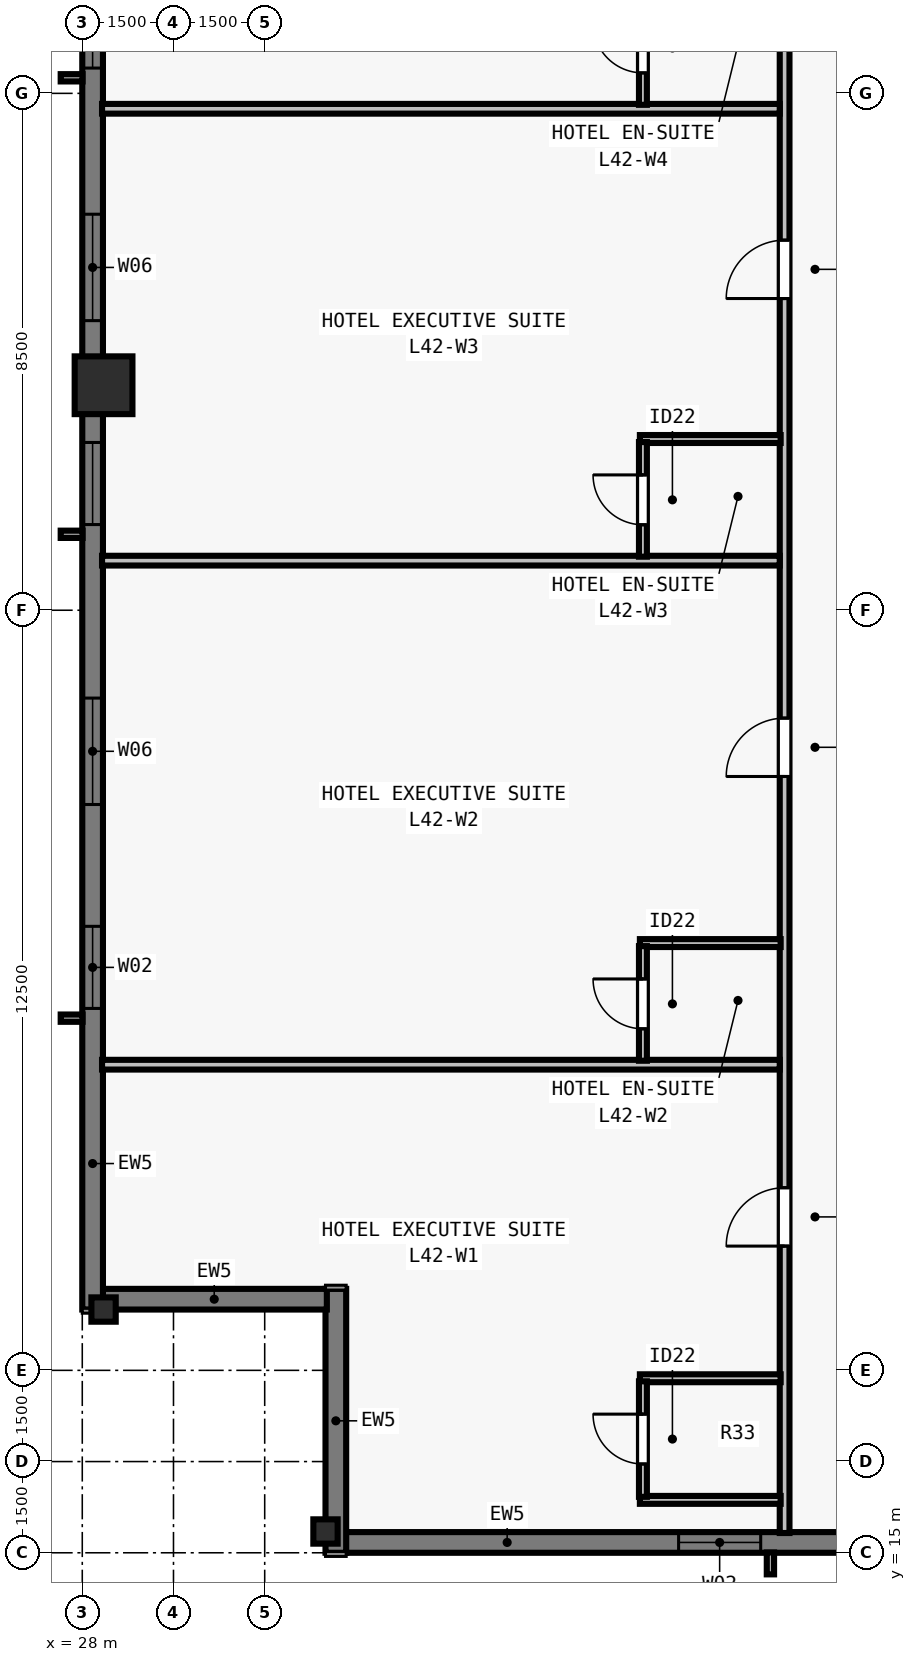
"""IFC4 building model, lengths in metres.
Left out: names, types, materials, properties, quantities, classifications, styles, units other than length and angle.
Written with IfcOpenShell. Run it as: python <this file> out.ifc"""

import sys

from ifc_helpers import new_model, si_unit, direction, frame, frame_2d, origin, origin_2d, place, context, subcontext, project, spatial, rectangle, i_section, extrude, element, fill, save


model = new_model("IFC4")
c1 = context("Model", 3, precision=1e-05, world=origin(), true_north=direction((0.0, 1.0)))
c2 = subcontext(c1, "Body", "Model", "MODEL_VIEW")
j1 = project(units=[si_unit("LENGTHUNIT", "METRE"), si_unit("PLANEANGLEUNIT", "RADIAN")], contexts=[c1])
p1 = place(None, origin())
s1 = spatial("IfcSite", under=j1, at=p1, CompositionType="ELEMENT")
p2 = place(p1, origin())
s2 = spatial("IfcBuilding", under=s1, at=p2, CompositionType="ELEMENT")
p3 = place(p2, frame((0.0, 0.0, 155.0)))
s3 = spatial("IfcBuildingStorey", under=s2, at=p3, CompositionType="ELEMENT", Elevation=155.0)
p4 = place(p3, frame((32.0, 15.35, 0.0), z_axis=(0.0, 0.0, 1.0), x_axis=(1.0, 0.0, 0.0)))
e1 = element("IfcColumn", 1, at=p4, inside=s3, PredefinedType="COLUMN", context=c2, shape_type="SweptSolid", body=[
    extrude(i_section(OverallWidth=0.4, OverallDepth=0.4, WebThickness=0.022, FlangeThickness=0.036, at=origin_2d()), origin(), (0.0, 0.0, 1.0), 3.5),
])
p5 = place(p3, frame((28.35, 34.2, 0.0), z_axis=(0.0, 0.0, 1.0), x_axis=(0.0, 1.0, 0.0)))
e2 = element("IfcColumn", 2, at=p5, inside=s3, PredefinedType="COLUMN", context=c2, shape_type="SweptSolid", body=[
    extrude(rectangle(XDim=0.95, YDim=0.95, at=origin_2d()), origin(), (0.0, 0.0, 1.0), 3.5),
])
p6 = place(p3, frame((28.35, 19.0, 0.0), z_axis=(0.0, 0.0, 1.0), x_axis=(0.0, 1.0, 0.0)))
e3 = element("IfcColumn", 3, at=p6, inside=s3, PredefinedType="COLUMN", context=c2, shape_type="SweptSolid", body=[
    extrude(i_section(OverallWidth=0.4, OverallDepth=0.4, WebThickness=0.022, FlangeThickness=0.036, at=origin_2d()), origin(), (0.0, 0.0, 1.0), 3.5),
])
p7 = place(p3, frame((48.6, 15.17, 0.0), z_axis=(0.0, 0.0, 1.0), x_axis=(-1.0, 0.0, 0.0)))
e4 = element("IfcWall", 4, at=p7, inside=s3, PredefinedType="SOLIDWALL", context=c2, shape_type="SweptSolid", body=[
    extrude(rectangle(XDim=16.282, YDim=0.34, at=frame_2d((8.141, 0.0))), origin(), (0.0, 0.0, 1.0), 3.28),
])
p8 = place(p7, frame((2.439, 0.0, 0.8)))
e5 = element("IfcOpeningElement", 5, at=p8, cuts=e4, PredefinedType="OPENING", context=c2, shape_type="SweptSolid", body=[
    extrude(rectangle(XDim=1.35, YDim=1.66, at=frame_2d((0.675, 0.83))), frame((0.0, 0.18, 0.0), z_axis=(0.0, -1.0, 0.0), x_axis=(1.0, 0.0, 0.0)), (0.0, 0.0, 1.0), 0.36),
])
p9 = place(p7, frame((4.716, 0.0, 0.8)))
e6 = element("IfcOpeningElement", 6, at=p9, cuts=e4, PredefinedType="OPENING", context=c2, shape_type="SweptSolid", body=[
    extrude(rectangle(XDim=1.75, YDim=1.66, at=frame_2d((0.875, 0.83))), frame((0.0, 0.18, 0.0), z_axis=(0.0, -1.0, 0.0), x_axis=(1.0, 0.0, 0.0)), (0.0, 0.0, 1.0), 0.36),
])
p10 = place(p7, frame((9.443, 0.0, 0.8)))
e7 = element("IfcOpeningElement", 7, at=p10, cuts=e4, PredefinedType="OPENING", context=c2, shape_type="SweptSolid", body=[
    extrude(rectangle(XDim=1.35, YDim=1.66, at=frame_2d((0.675, 0.83))), frame((0.0, 0.18, 0.0), z_axis=(0.0, -1.0, 0.0), x_axis=(1.0, 0.0, 0.0)), (0.0, 0.0, 1.0), 0.36),
])
p11 = place(p3, frame((32.17, 15.0, 0.0), z_axis=(0.0, 0.0, 1.0), x_axis=(0.0, 1.0, 0.0)))
e8 = element("IfcWall", 8, at=p11, inside=s3, PredefinedType="SOLIDWALL", context=c2, shape_type="SweptSolid", body=[
    extrude(rectangle(XDim=4.34, YDim=0.34, at=frame_2d((2.17, 0.0))), origin(), (0.0, 0.0, 1.0), 3.28),
])
p12 = place(p3, frame((32.022, 19.17, 0.0), z_axis=(0.0, 0.0, 1.0), x_axis=(-1.0, 0.0, 0.0)))
e9 = element("IfcWall", 9, at=p12, inside=s3, PredefinedType="SOLIDWALL", context=c2, shape_type="SweptSolid", body=[
    extrude(rectangle(XDim=3.704, YDim=0.34, at=frame_2d((1.852, 0.0))), origin(), (0.0, 0.0, 1.0), 3.28),
])
p13 = place(p3, frame((28.17, 19.0, 0.0), z_axis=(0.0, 0.0, 1.0), x_axis=(0.0, 1.0, 0.0)))
e10 = element("IfcWall", 10, at=p13, inside=s3, PredefinedType="SOLIDWALL", context=c2, shape_type="SweptSolid", body=[
    extrude(rectangle(XDim=39.682, YDim=0.34, at=frame_2d((19.841, 0.0))), origin(), (0.0, 0.0, 1.0), 3.28),
])
p14 = place(p13, frame((4.952, 0.0, 0.8)))
e11 = element("IfcOpeningElement", 11, at=p14, cuts=e10, PredefinedType="OPENING", context=c2, shape_type="SweptSolid", body=[
    extrude(rectangle(XDim=1.35, YDim=1.66, at=frame_2d((0.675, 0.83))), frame((0.0, 0.18, 0.0), z_axis=(0.0, -1.0, 0.0), x_axis=(1.0, 0.0, 0.0)), (0.0, 0.0, 1.0), 0.36),
])
p15 = place(p13, frame((8.305, 0.0, 0.8)))
e12 = element("IfcOpeningElement", 12, at=p15, cuts=e10, PredefinedType="OPENING", context=c2, shape_type="SweptSolid", body=[
    extrude(rectangle(XDim=1.75, YDim=1.66, at=frame_2d((0.875, 0.83))), frame((0.0, 0.18, 0.0), z_axis=(0.0, -1.0, 0.0), x_axis=(1.0, 0.0, 0.0)), (0.0, 0.0, 1.0), 0.36),
])
p16 = place(p13, frame((12.909, 0.0, 0.8)))
e13 = element("IfcOpeningElement", 13, at=p16, cuts=e10, PredefinedType="OPENING", context=c2, shape_type="SweptSolid", body=[
    extrude(rectangle(XDim=1.35, YDim=1.66, at=frame_2d((0.675, 0.83))), frame((0.0, 0.18, 0.0), z_axis=(0.0, -1.0, 0.0), x_axis=(1.0, 0.0, 0.0)), (0.0, 0.0, 1.0), 0.36),
])
p17 = place(p13, frame((16.262, 0.0, 0.8)))
e14 = element("IfcOpeningElement", 14, at=p17, cuts=e10, PredefinedType="OPENING", context=c2, shape_type="SweptSolid", body=[
    extrude(rectangle(XDim=1.75, YDim=1.66, at=frame_2d((0.875, 0.83))), frame((0.0, 0.18, 0.0), z_axis=(0.0, -1.0, 0.0), x_axis=(1.0, 0.0, 0.0)), (0.0, 0.0, 1.0), 0.36),
])
p18 = place(p13, frame((20.416, 0.0, 0.8)))
e15 = element("IfcOpeningElement", 15, at=p18, cuts=e10, PredefinedType="OPENING", context=c2, shape_type="SweptSolid", body=[
    extrude(rectangle(XDim=1.35, YDim=1.66, at=frame_2d((0.675, 0.83))), frame((0.0, 0.18, 0.0), z_axis=(0.0, -1.0, 0.0), x_axis=(1.0, 0.0, 0.0)), (0.0, 0.0, 1.0), 0.36),
])
p19 = place(p13, frame((22.07, 0.0, 0.8)))
e16 = element("IfcOpeningElement", 16, at=p19, cuts=e10, PredefinedType="OPENING", context=c2, shape_type="SweptSolid", body=[
    extrude(rectangle(XDim=1.75, YDim=1.66, at=frame_2d((0.875, 0.83))), frame((0.0, 0.18, 0.0), z_axis=(0.0, -1.0, 0.0), x_axis=(1.0, 0.0, 0.0)), (0.0, 0.0, 1.0), 0.36),
])
p20 = place(p13, frame((26.273, 0.0, 0.8)))
e17 = element("IfcOpeningElement", 17, at=p20, cuts=e10, PredefinedType="OPENING", context=c2, shape_type="SweptSolid", body=[
    extrude(rectangle(XDim=1.35, YDim=1.66, at=frame_2d((0.675, 0.83))), frame((0.0, 0.18, 0.0), z_axis=(0.0, -1.0, 0.0), x_axis=(1.0, 0.0, 0.0)), (0.0, 0.0, 1.0), 0.36),
])
p21 = place(p13, frame((29.627, 0.0, 0.8)))
e18 = element("IfcOpeningElement", 18, at=p21, cuts=e10, PredefinedType="OPENING", context=c2, shape_type="SweptSolid", body=[
    extrude(rectangle(XDim=1.75, YDim=1.66, at=frame_2d((0.875, 0.83))), frame((0.0, 0.18, 0.0), z_axis=(0.0, -1.0, 0.0), x_axis=(1.0, 0.0, 0.0)), (0.0, 0.0, 1.0), 0.36),
])
p22 = place(p13, frame((33.38, 0.0, 0.8)))
e19 = element("IfcOpeningElement", 19, at=p22, cuts=e10, PredefinedType="OPENING", context=c2, shape_type="SweptSolid", body=[
    extrude(rectangle(XDim=1.35, YDim=1.66, at=frame_2d((0.675, 0.83))), frame((0.0, 0.18, 0.0), z_axis=(0.0, -1.0, 0.0), x_axis=(1.0, 0.0, 0.0)), (0.0, 0.0, 1.0), 0.36),
])
p23 = place(p3, frame((39.55, 15.325, 0.0), z_axis=(0.0, 0.0, 1.0), x_axis=(0.0, 1.0, 0.0)))
e20 = element("IfcWall", 20, at=p23, inside=s3, PredefinedType="PARTITIONING", context=c2, shape_type="SweptSolid", body=[
    extrude(rectangle(XDim=47.35, YDim=0.16, at=frame_2d((23.675, 0.0))), origin(), (0.0, 0.0, 1.0), 2.555),
])
p24 = place(p23, frame((4.718, 0.0, 0.0)))
e21 = element("IfcOpeningElement", 21, at=p24, cuts=e20, PredefinedType="OPENING", context=c2, shape_type="SweptSolid", body=[
    extrude(rectangle(XDim=0.96, YDim=2.15, at=frame_2d((0.48, 1.075))), frame((0.0, 0.09, 0.0), z_axis=(0.0, -1.0, 0.0), x_axis=(1.0, 0.0, 0.0)), (0.0, 0.0, 1.0), 0.18),
])
p25 = place(p23, frame((12.441, 0.0, 0.0)))
e22 = element("IfcOpeningElement", 22, at=p25, cuts=e20, PredefinedType="OPENING", context=c2, shape_type="SweptSolid", body=[
    extrude(rectangle(XDim=0.96, YDim=2.15, at=frame_2d((0.48, 1.075))), frame((0.0, 0.09, 0.0), z_axis=(0.0, -1.0, 0.0), x_axis=(1.0, 0.0, 0.0)), (0.0, 0.0, 1.0), 0.18),
])
p26 = place(p23, frame((20.301, 0.0, 0.0)))
e23 = element("IfcOpeningElement", 23, at=p26, cuts=e20, PredefinedType="OPENING", context=c2, shape_type="SweptSolid", body=[
    extrude(rectangle(XDim=0.96, YDim=2.15, at=frame_2d((0.48, 1.075))), frame((0.0, 0.09, 0.0), z_axis=(0.0, -1.0, 0.0), x_axis=(1.0, 0.0, 0.0)), (0.0, 0.0, 1.0), 0.18),
])
p27 = place(p23, frame((28.161, 0.0, 0.0)))
e24 = element("IfcOpeningElement", 24, at=p27, cuts=e20, PredefinedType="OPENING", context=c2, shape_type="SweptSolid", body=[
    extrude(rectangle(XDim=0.96, YDim=2.15, at=frame_2d((0.48, 1.075))), frame((0.0, 0.09, 0.0), z_axis=(0.0, -1.0, 0.0), x_axis=(1.0, 0.0, 0.0)), (0.0, 0.0, 1.0), 0.18),
])
p28 = place(p23, frame((36.021, 0.0, 0.0)))
e25 = element("IfcOpeningElement", 25, at=p28, cuts=e20, PredefinedType="OPENING", context=c2, shape_type="SweptSolid", body=[
    extrude(rectangle(XDim=0.96, YDim=2.15, at=frame_2d((0.48, 1.075))), frame((0.0, 0.09, 0.0), z_axis=(0.0, -1.0, 0.0), x_axis=(1.0, 0.0, 0.0)), (0.0, 0.0, 1.0), 0.18),
])
p29 = place(p23, frame((43.793, 0.0, 0.0)))
e26 = element("IfcOpeningElement", 26, at=p29, cuts=e20, PredefinedType="OPENING", context=c2, shape_type="SweptSolid", body=[
    extrude(rectangle(XDim=0.96, YDim=2.15, at=frame_2d((0.48, 1.075))), frame((0.0, 0.09, 0.0), z_axis=(0.0, -1.0, 0.0), x_axis=(1.0, 0.0, 0.0)), (0.0, 0.0, 1.0), 0.18),
])
for number, where, z_axis, x_axis in (
    (27, (37.17, 15.87, 0.0), (0.0, 0.0, 1.0), (1.0, 0.0, 0.0)),
    (28, (37.17, 17.87, 0.0), (0.0, 0.0, 1.0), (1.0, 0.0, 0.0)),
):
    element("IfcWall", number, at=place(p3, frame(where, z_axis=z_axis, x_axis=x_axis)), inside=s3, PredefinedType="PLUMBINGWALL", context=c2, shape_type="SweptSolid", body=[
        extrude(rectangle(XDim=2.315, YDim=0.13, at=frame_2d((1.158, 0.0))), origin(), (0.0, 0.0, 1.0), 3.28),
    ])
p30 = place(p3, frame((37.22, 15.92, 0.0), z_axis=(0.0, 0.0, 1.0), x_axis=(0.0, 1.0, 0.0)))
e29 = element("IfcWall", 29, at=p30, inside=s3, PredefinedType="PLUMBINGWALL", context=c2, shape_type="SweptSolid", body=[
    extrude(rectangle(XDim=1.9, YDim=0.13, at=frame_2d((0.95, 0.0))), origin(), (0.0, 0.0, 1.0), 3.28),
])
p31 = place(p30, frame((0.54, 0.0, 0.0)))
e30 = element("IfcOpeningElement", 30, at=p31, cuts=e29, PredefinedType="OPENING", context=c2, shape_type="SweptSolid", body=[
    extrude(rectangle(XDim=0.82, YDim=2.1, at=frame_2d((0.41, 1.05))), frame((0.0, 0.075, 0.0), z_axis=(0.0, -1.0, 0.0), x_axis=(1.0, 0.0, 0.0)), (0.0, 0.0, 1.0), 0.15),
])
p32 = place(p3, frame((28.325, 23.027, 0.0), z_axis=(0.0, 0.0, 1.0), x_axis=(1.0, 0.0, 0.0)))
e31 = element("IfcWall", 31, at=p32, inside=s3, PredefinedType="PARTITIONING", context=c2, shape_type="SweptSolid", body=[
    extrude(rectangle(XDim=11.145, YDim=0.16, at=frame_2d((5.573, 0.0))), origin(), (0.0, 0.0, 1.0), 2.896),
])
p33 = place(p3, frame((37.17, 25.027, 0.0), z_axis=(0.0, 0.0, 1.0), x_axis=(1.0, 0.0, 0.0)))
e32 = element("IfcWall", 32, at=p33, inside=s3, PredefinedType="PLUMBINGWALL", context=c2, shape_type="SweptSolid", body=[
    extrude(rectangle(XDim=2.315, YDim=0.13, at=frame_2d((1.158, 0.0))), origin(), (0.0, 0.0, 1.0), 3.28),
])
p34 = place(p3, frame((37.22, 23.092, 0.0), z_axis=(0.0, 0.0, 1.0), x_axis=(0.0, 1.0, 0.0)))
e33 = element("IfcWall", 33, at=p34, inside=s3, PredefinedType="PLUMBINGWALL", context=c2, shape_type="SweptSolid", body=[
    extrude(rectangle(XDim=1.885, YDim=0.13, at=frame_2d((0.942, 0.0))), origin(), (0.0, 0.0, 1.0), 3.28),
])
p35 = place(p34, frame((0.525, 0.0, 0.0)))
e34 = element("IfcOpeningElement", 34, at=p35, cuts=e33, PredefinedType="OPENING", context=c2, shape_type="SweptSolid", body=[
    extrude(rectangle(XDim=0.82, YDim=2.1, at=frame_2d((0.41, 1.05))), frame((0.0, 0.075, 0.0), z_axis=(0.0, -1.0, 0.0), x_axis=(1.0, 0.0, 0.0)), (0.0, 0.0, 1.0), 0.15),
])
p36 = place(p3, frame((28.325, 31.315, 0.0), z_axis=(0.0, 0.0, 1.0), x_axis=(1.0, 0.0, 0.0)))
e35 = element("IfcWall", 35, at=p36, inside=s3, PredefinedType="PARTITIONING", context=c2, shape_type="SweptSolid", body=[
    extrude(rectangle(XDim=11.145, YDim=0.16, at=frame_2d((5.573, 0.0))), origin(), (0.0, 0.0, 1.0), 3.28),
])
p37 = place(p3, frame((37.17, 33.315, 0.0), z_axis=(0.0, 0.0, 1.0), x_axis=(1.0, 0.0, 0.0)))
e36 = element("IfcWall", 36, at=p37, inside=s3, PredefinedType="PLUMBINGWALL", context=c2, shape_type="SweptSolid", body=[
    extrude(rectangle(XDim=2.315, YDim=0.13, at=frame_2d((1.158, 0.0))), origin(), (0.0, 0.0, 1.0), 3.28),
])
p38 = place(p3, frame((37.22, 31.381, 0.0), z_axis=(0.0, 0.0, 1.0), x_axis=(0.0, 1.0, 0.0)))
e37 = element("IfcWall", 37, at=p38, inside=s3, PredefinedType="PLUMBINGWALL", context=c2, shape_type="SweptSolid", body=[
    extrude(rectangle(XDim=1.885, YDim=0.13, at=frame_2d((0.942, 0.0))), origin(), (0.0, 0.0, 1.0), 3.28),
])
p39 = place(p38, frame((0.525, 0.0, 0.0)))
e38 = element("IfcOpeningElement", 38, at=p39, cuts=e37, PredefinedType="OPENING", context=c2, shape_type="SweptSolid", body=[
    extrude(rectangle(XDim=0.82, YDim=2.1, at=frame_2d((0.41, 1.05))), frame((0.0, 0.075, 0.0), z_axis=(0.0, -1.0, 0.0), x_axis=(1.0, 0.0, 0.0)), (0.0, 0.0, 1.0), 0.15),
])
p40 = place(p3, frame((28.325, 38.747, 0.0), z_axis=(0.0, 0.0, 1.0), x_axis=(1.0, 0.0, 0.0)))
e39 = element("IfcWall", 39, at=p40, inside=s3, PredefinedType="PARTITIONING", context=c2, shape_type="SweptSolid", body=[
    extrude(rectangle(XDim=11.145, YDim=0.16, at=frame_2d((5.573, 0.0))), origin(), (0.0, 0.0, 1.0), 2.896),
])
p41 = place(p3, frame((37.22, 38.812, 0.0), z_axis=(0.0, 0.0, 1.0), x_axis=(0.0, 1.0, 0.0)))
e40 = element("IfcWall", 40, at=p41, inside=s3, PredefinedType="PLUMBINGWALL", context=c2, shape_type="SweptSolid", body=[
    extrude(rectangle(XDim=1.885, YDim=0.13, at=frame_2d((0.942, 0.0))), origin(), (0.0, 0.0, 1.0), 3.28),
])
p42 = place(p41, frame((0.525, 0.0, 0.0)))
e41 = element("IfcOpeningElement", 41, at=p42, cuts=e40, PredefinedType="OPENING", context=c2, shape_type="SweptSolid", body=[
    extrude(rectangle(XDim=0.82, YDim=2.1, at=frame_2d((0.41, 1.05))), frame((0.0, 0.075, 0.0), z_axis=(0.0, -1.0, 0.0), x_axis=(1.0, 0.0, 0.0)), (0.0, 0.0, 1.0), 0.15),
])
p43 = place(p10, origin())
e42 = element("IfcWindow", 42, at=p43, inside=s3, PartitioningType="SINGLE_PANEL", PredefinedType="WINDOW", context=c2, shape_type="SweptSolid", body=[
    extrude(rectangle(XDim=1.35, YDim=1.66, at=frame_2d((0.675, 0.83))), frame((0.0, -0.05, 0.0), z_axis=(0.0, -1.0, 0.0), x_axis=(1.0, 0.0, 0.0)), (0.0, 0.0, 1.0), 0.06),
])
fill(e7, e42)
p44 = place(p14, origin())
e43 = element("IfcWindow", 43, at=p44, inside=s3, PartitioningType="SINGLE_PANEL", PredefinedType="WINDOW", context=c2, shape_type="SweptSolid", body=[
    extrude(rectangle(XDim=1.35, YDim=1.66, at=frame_2d((0.675, 0.83))), frame((0.0, -0.05, 0.0), z_axis=(0.0, -1.0, 0.0), x_axis=(1.0, 0.0, 0.0)), (0.0, 0.0, 1.0), 0.06),
])
fill(e11, e43)
p45 = place(p15, origin())
e44 = element("IfcWindow", 44, at=p45, inside=s3, PartitioningType="SINGLE_PANEL", PredefinedType="WINDOW", context=c2, shape_type="SweptSolid", body=[
    extrude(rectangle(XDim=1.75, YDim=1.66, at=frame_2d((0.875, 0.83))), frame((0.0, -0.05, 0.0), z_axis=(0.0, -1.0, 0.0), x_axis=(1.0, 0.0, 0.0)), (0.0, 0.0, 1.0), 0.06),
])
fill(e12, e44)
p46 = place(p16, origin())
e45 = element("IfcWindow", 45, at=p46, inside=s3, PartitioningType="SINGLE_PANEL", PredefinedType="WINDOW", context=c2, shape_type="SweptSolid", body=[
    extrude(rectangle(XDim=1.35, YDim=1.66, at=frame_2d((0.675, 0.83))), frame((0.0, -0.05, 0.0), z_axis=(0.0, -1.0, 0.0), x_axis=(1.0, 0.0, 0.0)), (0.0, 0.0, 1.0), 0.06),
])
fill(e13, e45)
p47 = place(p17, origin())
e46 = element("IfcWindow", 46, at=p47, inside=s3, PartitioningType="SINGLE_PANEL", PredefinedType="WINDOW", context=c2, shape_type="SweptSolid", body=[
    extrude(rectangle(XDim=1.75, YDim=1.66, at=frame_2d((0.875, 0.83))), frame((0.0, -0.05, 0.0), z_axis=(0.0, -1.0, 0.0), x_axis=(1.0, 0.0, 0.0)), (0.0, 0.0, 1.0), 0.06),
])
fill(e14, e46)
p48 = place(p18, origin())
e47 = element("IfcWindow", 47, at=p48, inside=s3, PartitioningType="SINGLE_PANEL", PredefinedType="WINDOW", context=c2, shape_type="SweptSolid", body=[
    extrude(rectangle(XDim=1.35, YDim=1.66, at=frame_2d((0.675, 0.83))), frame((0.0, -0.05, 0.0), z_axis=(0.0, -1.0, 0.0), x_axis=(1.0, 0.0, 0.0)), (0.0, 0.0, 1.0), 0.06),
])
fill(e15, e47)
p49 = place(p31, origin())
e48 = element("IfcDoor", 48, at=p49, inside=s3, OperationType="SINGLE_SWING_RIGHT", PredefinedType="DOOR", context=c2, shape_type="SweptSolid", body=[
    extrude(rectangle(XDim=0.82, YDim=2.1, at=frame_2d((0.41, 1.05))), frame((0.0, 0.025, 0.0), z_axis=(0.0, -1.0, 0.0), x_axis=(1.0, 0.0, 0.0)), (0.0, 0.0, 1.0), 0.05),
])
fill(e30, e48)
p50 = place(p24, origin())
e49 = element("IfcDoor", 49, at=p50, inside=s3, OperationType="SINGLE_SWING_LEFT", PredefinedType="DOOR", context=c2, shape_type="SweptSolid", body=[
    extrude(rectangle(XDim=0.96, YDim=2.15, at=frame_2d((0.48, 1.075))), frame((0.0, 0.025, 0.0), z_axis=(0.0, -1.0, 0.0), x_axis=(1.0, 0.0, 0.0)), (0.0, 0.0, 1.0), 0.05),
])
fill(e21, e49)
p51 = place(p35, origin())
e50 = element("IfcDoor", 50, at=p51, inside=s3, OperationType="SINGLE_SWING_RIGHT", PredefinedType="DOOR", context=c2, shape_type="SweptSolid", body=[
    extrude(rectangle(XDim=0.82, YDim=2.1, at=frame_2d((0.41, 1.05))), frame((0.0, 0.025, 0.0), z_axis=(0.0, -1.0, 0.0), x_axis=(1.0, 0.0, 0.0)), (0.0, 0.0, 1.0), 0.05),
])
fill(e34, e50)
p52 = place(p25, origin())
e51 = element("IfcDoor", 51, at=p52, inside=s3, OperationType="SINGLE_SWING_LEFT", PredefinedType="DOOR", context=c2, shape_type="SweptSolid", body=[
    extrude(rectangle(XDim=0.96, YDim=2.15, at=frame_2d((0.48, 1.075))), frame((0.0, 0.025, 0.0), z_axis=(0.0, -1.0, 0.0), x_axis=(1.0, 0.0, 0.0)), (0.0, 0.0, 1.0), 0.05),
])
fill(e22, e51)
p53 = place(p39, origin())
e52 = element("IfcDoor", 52, at=p53, inside=s3, OperationType="SINGLE_SWING_RIGHT", PredefinedType="DOOR", context=c2, shape_type="SweptSolid", body=[
    extrude(rectangle(XDim=0.82, YDim=2.1, at=frame_2d((0.41, 1.05))), frame((0.0, 0.025, 0.0), z_axis=(0.0, -1.0, 0.0), x_axis=(1.0, 0.0, 0.0)), (0.0, 0.0, 1.0), 0.05),
])
fill(e38, e52)
p54 = place(p26, origin())
e53 = element("IfcDoor", 53, at=p54, inside=s3, OperationType="SINGLE_SWING_LEFT", PredefinedType="DOOR", context=c2, shape_type="SweptSolid", body=[
    extrude(rectangle(XDim=0.96, YDim=2.15, at=frame_2d((0.48, 1.075))), frame((0.0, 0.025, 0.0), z_axis=(0.0, -1.0, 0.0), x_axis=(1.0, 0.0, 0.0)), (0.0, 0.0, 1.0), 0.05),
])
fill(e23, e53)
p55 = place(p42, origin())
e54 = element("IfcDoor", 54, at=p55, inside=s3, OperationType="SINGLE_SWING_RIGHT", PredefinedType="DOOR", context=c2, shape_type="SweptSolid", body=[
    extrude(rectangle(XDim=0.82, YDim=2.1, at=frame_2d((0.41, 1.05))), frame((0.0, 0.025, 0.0), z_axis=(0.0, -1.0, 0.0), x_axis=(1.0, 0.0, 0.0)), (0.0, 0.0, 1.0), 0.05),
])
fill(e41, e54)
save(model, sys.argv[1])
